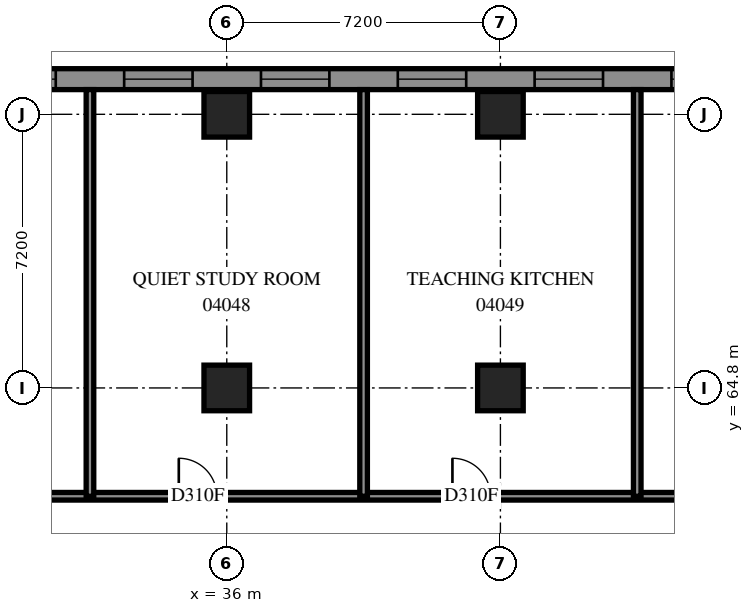
"""IFC4 building model, lengths in metres.
Left out: names, types, materials, properties, quantities, classifications, styles, units other than length and angle.
Written with IfcOpenShell. Run it as: python <this file> out.ifc"""

import sys

from ifc_helpers import new_model, si_unit, direction, frame, frame_2d, origin, origin_2d, place, context, subcontext, project, spatial, polyline, rectangle, outline, extrude, element, fill, save


model = new_model("IFC4")
c1 = context("Model", 3, precision=1e-05, world=origin(), true_north=direction((0.0, 1.0)))
c2 = subcontext(c1, "Body", "Model", "MODEL_VIEW")
j1 = project(units=[si_unit("LENGTHUNIT", "METRE"), si_unit("PLANEANGLEUNIT", "RADIAN")], contexts=[c1])
p1 = place(None, origin())
s1 = spatial("IfcSite", under=j1, at=p1, CompositionType="ELEMENT")
p2 = place(p1, origin())
s2 = spatial("IfcBuilding", under=s1, at=p2, CompositionType="ELEMENT")
p3 = place(p2, frame((0.0, 0.0, 18.6)))
s3 = spatial("IfcBuildingStorey", under=s2, at=p3, CompositionType="ELEMENT", Elevation=18.6)
for number, where, z_axis, x_axis in (
    (1, (36.0, 64.8, 0.0), (0.0, 0.0, 1.0), (1.0, 0.0, 0.0)),
    (2, (36.0, 72.0, 0.0), (0.0, 0.0, 1.0), (1.0, 0.0, 0.0)),
    (3, (43.2, 64.8, 0.0), (0.0, 0.0, 1.0), (1.0, 0.0, 0.0)),
    (4, (43.2, 72.0, 0.0), (0.0, 0.0, 1.0), (1.0, 0.0, 0.0)),
):
    element("IfcColumn", number, at=place(p3, frame(where, z_axis=z_axis, x_axis=x_axis)), inside=s3, PredefinedType="COLUMN", context=c2, shape_type="SweptSolid", body=[
        extrude(rectangle(XDim=1.2, YDim=1.2, at=origin_2d()), origin(), (0.0, 0.0, 1.0), 3.8),
    ])
p4 = place(p3, frame((79.583, 72.925, 0.0), z_axis=(0.0, 0.0, 1.0), x_axis=(-1.0, 0.0, 0.0)))
e5 = element("IfcWall", 5, at=p4, inside=s3, PredefinedType="SOLIDWALL", context=c2, shape_type="SweptSolid", body=[
    extrude(outline(polyline([(-0.114, -0.275), (79.583, -0.275), (79.033, 0.275), (0.114, 0.275), (-0.114, -0.275)])), origin(), (0.0, 0.0, 1.0), 3.8),
])
p5 = place(p4, frame((1.249, 0.0, 0.7)))
e6 = element("IfcOpeningElement", 6, at=p5, cuts=e5, PredefinedType="OPENING", context=c2, shape_type="SweptSolid", body=[
    extrude(rectangle(XDim=1.8, YDim=2.4, at=frame_2d((0.9, 1.2))), frame((0.0, 0.285, 0.0), z_axis=(0.0, -1.0, 0.0), x_axis=(1.0, 0.0, 0.0)), (0.0, 0.0, 1.0), 0.57),
])
p6 = place(p4, frame((4.883, 0.0, 0.7)))
e7 = element("IfcOpeningElement", 7, at=p6, cuts=e5, PredefinedType="OPENING", context=c2, shape_type="SweptSolid", body=[
    extrude(rectangle(XDim=1.8, YDim=2.4, at=frame_2d((0.9, 1.2))), frame((0.0, 0.285, 0.0), z_axis=(0.0, -1.0, 0.0), x_axis=(1.0, 0.0, 0.0)), (0.0, 0.0, 1.0), 0.57),
])
p7 = place(p4, frame((8.483, 0.0, 0.7)))
e8 = element("IfcOpeningElement", 8, at=p7, cuts=e5, PredefinedType="OPENING", context=c2, shape_type="SweptSolid", body=[
    extrude(rectangle(XDim=1.8, YDim=2.4, at=frame_2d((0.9, 1.2))), frame((0.0, 0.285, 0.0), z_axis=(0.0, -1.0, 0.0), x_axis=(1.0, 0.0, 0.0)), (0.0, 0.0, 1.0), 0.57),
])
p8 = place(p4, frame((12.083, 0.0, 0.7)))
e9 = element("IfcOpeningElement", 9, at=p8, cuts=e5, PredefinedType="OPENING", context=c2, shape_type="SweptSolid", body=[
    extrude(rectangle(XDim=1.8, YDim=2.4, at=frame_2d((0.9, 1.2))), frame((0.0, 0.285, 0.0), z_axis=(0.0, -1.0, 0.0), x_axis=(1.0, 0.0, 0.0)), (0.0, 0.0, 1.0), 0.57),
])
p9 = place(p4, frame((15.683, 0.0, 0.7)))
e10 = element("IfcOpeningElement", 10, at=p9, cuts=e5, PredefinedType="OPENING", context=c2, shape_type="SweptSolid", body=[
    extrude(rectangle(XDim=1.8, YDim=2.4, at=frame_2d((0.9, 1.2))), frame((0.0, 0.285, 0.0), z_axis=(0.0, -1.0, 0.0), x_axis=(1.0, 0.0, 0.0)), (0.0, 0.0, 1.0), 0.57),
])
p10 = place(p4, frame((19.283, 0.0, 0.7)))
e11 = element("IfcOpeningElement", 11, at=p10, cuts=e5, PredefinedType="OPENING", context=c2, shape_type="SweptSolid", body=[
    extrude(rectangle(XDim=1.8, YDim=2.4, at=frame_2d((0.9, 1.2))), frame((0.0, 0.285, 0.0), z_axis=(0.0, -1.0, 0.0), x_axis=(1.0, 0.0, 0.0)), (0.0, 0.0, 1.0), 0.57),
])
p11 = place(p4, frame((22.883, 0.0, 0.7)))
e12 = element("IfcOpeningElement", 12, at=p11, cuts=e5, PredefinedType="OPENING", context=c2, shape_type="SweptSolid", body=[
    extrude(rectangle(XDim=1.8, YDim=2.4, at=frame_2d((0.9, 1.2))), frame((0.0, 0.285, 0.0), z_axis=(0.0, -1.0, 0.0), x_axis=(1.0, 0.0, 0.0)), (0.0, 0.0, 1.0), 0.57),
])
p12 = place(p4, frame((26.483, 0.0, 0.7)))
e13 = element("IfcOpeningElement", 13, at=p12, cuts=e5, PredefinedType="OPENING", context=c2, shape_type="SweptSolid", body=[
    extrude(rectangle(XDim=1.8, YDim=2.4, at=frame_2d((0.9, 1.2))), frame((0.0, 0.285, 0.0), z_axis=(0.0, -1.0, 0.0), x_axis=(1.0, 0.0, 0.0)), (0.0, 0.0, 1.0), 0.57),
])
p13 = place(p4, frame((30.083, 0.0, 0.7)))
e14 = element("IfcOpeningElement", 14, at=p13, cuts=e5, PredefinedType="OPENING", context=c2, shape_type="SweptSolid", body=[
    extrude(rectangle(XDim=1.8, YDim=2.4, at=frame_2d((0.9, 1.2))), frame((0.0, 0.285, 0.0), z_axis=(0.0, -1.0, 0.0), x_axis=(1.0, 0.0, 0.0)), (0.0, 0.0, 1.0), 0.57),
])
p14 = place(p4, frame((33.683, 0.0, 0.7)))
e15 = element("IfcOpeningElement", 15, at=p14, cuts=e5, PredefinedType="OPENING", context=c2, shape_type="SweptSolid", body=[
    extrude(rectangle(XDim=1.8, YDim=2.4, at=frame_2d((0.9, 1.2))), frame((0.0, 0.285, 0.0), z_axis=(0.0, -1.0, 0.0), x_axis=(1.0, 0.0, 0.0)), (0.0, 0.0, 1.0), 0.57),
])
p15 = place(p4, frame((37.283, 0.0, 0.7)))
e16 = element("IfcOpeningElement", 16, at=p15, cuts=e5, PredefinedType="OPENING", context=c2, shape_type="SweptSolid", body=[
    extrude(rectangle(XDim=1.8, YDim=2.4, at=frame_2d((0.9, 1.2))), frame((0.0, 0.285, 0.0), z_axis=(0.0, -1.0, 0.0), x_axis=(1.0, 0.0, 0.0)), (0.0, 0.0, 1.0), 0.57),
])
p16 = place(p4, frame((40.883, 0.0, 0.7)))
e17 = element("IfcOpeningElement", 17, at=p16, cuts=e5, PredefinedType="OPENING", context=c2, shape_type="SweptSolid", body=[
    extrude(rectangle(XDim=1.8, YDim=2.4, at=frame_2d((0.9, 1.2))), frame((0.0, 0.285, 0.0), z_axis=(0.0, -1.0, 0.0), x_axis=(1.0, 0.0, 0.0)), (0.0, 0.0, 1.0), 0.57),
])
p17 = place(p4, frame((44.483, 0.0, 0.7)))
e18 = element("IfcOpeningElement", 18, at=p17, cuts=e5, PredefinedType="OPENING", context=c2, shape_type="SweptSolid", body=[
    extrude(rectangle(XDim=1.8, YDim=2.4, at=frame_2d((0.9, 1.2))), frame((0.0, 0.285, 0.0), z_axis=(0.0, -1.0, 0.0), x_axis=(1.0, 0.0, 0.0)), (0.0, 0.0, 1.0), 0.57),
])
p18 = place(p4, frame((48.083, 0.0, 0.7)))
e19 = element("IfcOpeningElement", 19, at=p18, cuts=e5, PredefinedType="OPENING", context=c2, shape_type="SweptSolid", body=[
    extrude(rectangle(XDim=1.8, YDim=2.4, at=frame_2d((0.9, 1.2))), frame((0.0, 0.285, 0.0), z_axis=(0.0, -1.0, 0.0), x_axis=(1.0, 0.0, 0.0)), (0.0, 0.0, 1.0), 0.57),
])
p19 = place(p4, frame((51.683, 0.0, 0.7)))
e20 = element("IfcOpeningElement", 20, at=p19, cuts=e5, PredefinedType="OPENING", context=c2, shape_type="SweptSolid", body=[
    extrude(rectangle(XDim=1.8, YDim=2.4, at=frame_2d((0.9, 1.2))), frame((0.0, 0.285, 0.0), z_axis=(0.0, -1.0, 0.0), x_axis=(1.0, 0.0, 0.0)), (0.0, 0.0, 1.0), 0.57),
])
p20 = place(p4, frame((55.283, 0.0, 0.7)))
e21 = element("IfcOpeningElement", 21, at=p20, cuts=e5, PredefinedType="OPENING", context=c2, shape_type="SweptSolid", body=[
    extrude(rectangle(XDim=1.8, YDim=2.4, at=frame_2d((0.9, 1.2))), frame((0.0, 0.285, 0.0), z_axis=(0.0, -1.0, 0.0), x_axis=(1.0, 0.0, 0.0)), (0.0, 0.0, 1.0), 0.57),
])
p21 = place(p4, frame((58.883, 0.0, 0.7)))
e22 = element("IfcOpeningElement", 22, at=p21, cuts=e5, PredefinedType="OPENING", context=c2, shape_type="SweptSolid", body=[
    extrude(rectangle(XDim=1.8, YDim=2.4, at=frame_2d((0.9, 1.2))), frame((0.0, 0.285, 0.0), z_axis=(0.0, -1.0, 0.0), x_axis=(1.0, 0.0, 0.0)), (0.0, 0.0, 1.0), 0.57),
])
p22 = place(p4, frame((62.483, 0.0, 0.7)))
e23 = element("IfcOpeningElement", 23, at=p22, cuts=e5, PredefinedType="OPENING", context=c2, shape_type="SweptSolid", body=[
    extrude(rectangle(XDim=1.8, YDim=2.4, at=frame_2d((0.9, 1.2))), frame((0.0, 0.285, 0.0), z_axis=(0.0, -1.0, 0.0), x_axis=(1.0, 0.0, 0.0)), (0.0, 0.0, 1.0), 0.57),
])
p23 = place(p4, frame((66.083, 0.0, 0.7)))
e24 = element("IfcOpeningElement", 24, at=p23, cuts=e5, PredefinedType="OPENING", context=c2, shape_type="SweptSolid", body=[
    extrude(rectangle(XDim=1.8, YDim=2.4, at=frame_2d((0.9, 1.2))), frame((0.0, 0.285, 0.0), z_axis=(0.0, -1.0, 0.0), x_axis=(1.0, 0.0, 0.0)), (0.0, 0.0, 1.0), 0.57),
])
p24 = place(p4, frame((69.683, 0.0, 0.7)))
e25 = element("IfcOpeningElement", 25, at=p24, cuts=e5, PredefinedType="OPENING", context=c2, shape_type="SweptSolid", body=[
    extrude(rectangle(XDim=1.8, YDim=2.4, at=frame_2d((0.9, 1.2))), frame((0.0, 0.285, 0.0), z_axis=(0.0, -1.0, 0.0), x_axis=(1.0, 0.0, 0.0)), (0.0, 0.0, 1.0), 0.57),
])
p25 = place(p4, frame((73.683, 0.0, 0.7)))
e26 = element("IfcOpeningElement", 26, at=p25, cuts=e5, PredefinedType="OPENING", context=c2, shape_type="SweptSolid", body=[
    extrude(rectangle(XDim=1.8, YDim=2.4, at=frame_2d((0.9, 1.2))), frame((0.0, 0.285, 0.0), z_axis=(0.0, -1.0, 0.0), x_axis=(1.0, 0.0, 0.0)), (0.0, 0.0, 1.0), 0.57),
])
p26 = place(p4, frame((76.508, 0.0, 0.7)))
e27 = element("IfcOpeningElement", 27, at=p26, cuts=e5, PredefinedType="OPENING", context=c2, shape_type="SweptSolid", body=[
    extrude(rectangle(XDim=1.8, YDim=2.4, at=frame_2d((0.9, 1.2))), frame((0.0, 0.285, 0.0), z_axis=(0.0, -1.0, 0.0), x_axis=(1.0, 0.0, 0.0)), (0.0, 0.0, 1.0), 0.57),
])
p27 = place(p3, frame((0.002, 61.95, 0.0), z_axis=(0.0, 0.0, 1.0), x_axis=(1.0, 0.0, 0.0)))
e28 = element("IfcWall", 28, at=p27, inside=s3, PredefinedType="PARTITIONING", context=c2, shape_type="SweptSolid", body=[
    extrude(rectangle(XDim=55.098, YDim=0.2, at=frame_2d((27.549, 0.0))), origin(), (0.0, 0.0, 1.0), 3.8),
])
p28 = place(p27, frame((8.667, 0.0, 0.0)))
e29 = element("IfcOpeningElement", 29, at=p28, cuts=e28, PredefinedType="OPENING", context=c2, shape_type="SweptSolid", body=[
    extrude(rectangle(XDim=1.0, YDim=2.1, at=frame_2d((0.5, 1.05))), frame((0.0, 0.11, 0.0), z_axis=(0.0, -1.0, 0.0), x_axis=(1.0, 0.0, 0.0)), (0.0, 0.0, 1.0), 0.22),
])
p29 = place(p27, frame((13.136, 0.0, 0.0)))
e30 = element("IfcOpeningElement", 30, at=p29, cuts=e28, PredefinedType="OPENING", context=c2, shape_type="SweptSolid", body=[
    extrude(rectangle(XDim=1.0, YDim=2.1, at=frame_2d((0.5, 1.05))), frame((0.0, 0.11, 0.0), z_axis=(0.0, -1.0, 0.0), x_axis=(1.0, 0.0, 0.0)), (0.0, 0.0, 1.0), 0.22),
])
p30 = place(p27, frame((20.335, 0.0, 0.0)))
e31 = element("IfcOpeningElement", 31, at=p30, cuts=e28, PredefinedType="OPENING", context=c2, shape_type="SweptSolid", body=[
    extrude(rectangle(XDim=1.0, YDim=2.1, at=frame_2d((0.5, 1.05))), frame((0.0, 0.11, 0.0), z_axis=(0.0, -1.0, 0.0), x_axis=(1.0, 0.0, 0.0)), (0.0, 0.0, 1.0), 0.22),
])
p31 = place(p27, frame((27.535, 0.0, 0.0)))
e32 = element("IfcOpeningElement", 32, at=p31, cuts=e28, PredefinedType="OPENING", context=c2, shape_type="SweptSolid", body=[
    extrude(rectangle(XDim=1.0, YDim=2.1, at=frame_2d((0.5, 1.05))), frame((0.0, 0.11, 0.0), z_axis=(0.0, -1.0, 0.0), x_axis=(1.0, 0.0, 0.0)), (0.0, 0.0, 1.0), 0.22),
])
p32 = place(p27, frame((34.736, 0.0, 0.0)))
e33 = element("IfcOpeningElement", 33, at=p32, cuts=e28, PredefinedType="OPENING", context=c2, shape_type="SweptSolid", body=[
    extrude(rectangle(XDim=1.0, YDim=2.1, at=frame_2d((0.5, 1.05))), frame((0.0, 0.11, 0.0), z_axis=(0.0, -1.0, 0.0), x_axis=(1.0, 0.0, 0.0)), (0.0, 0.0, 1.0), 0.22),
])
p33 = place(p27, frame((41.935, 0.0, 0.0)))
e34 = element("IfcOpeningElement", 34, at=p33, cuts=e28, PredefinedType="OPENING", context=c2, shape_type="SweptSolid", body=[
    extrude(rectangle(XDim=1.0, YDim=2.1, at=frame_2d((0.5, 1.05))), frame((0.0, 0.11, 0.0), z_axis=(0.0, -1.0, 0.0), x_axis=(1.0, 0.0, 0.0)), (0.0, 0.0, 1.0), 0.22),
])
p34 = place(p27, frame((49.136, 0.0, 0.0)))
e35 = element("IfcOpeningElement", 35, at=p34, cuts=e28, PredefinedType="OPENING", context=c2, shape_type="SweptSolid", body=[
    extrude(rectangle(XDim=1.0, YDim=2.1, at=frame_2d((0.5, 1.05))), frame((0.0, 0.11, 0.0), z_axis=(0.0, -1.0, 0.0), x_axis=(1.0, 0.0, 0.0)), (0.0, 0.0, 1.0), 0.22),
])
p35 = place(p27, frame((4.799, 0.0, 0.0)))
e36 = element("IfcOpeningElement", 36, at=p35, cuts=e28, PredefinedType="OPENING", context=c2, shape_type="SweptSolid", body=[
    extrude(rectangle(XDim=1.0, YDim=2.1, at=frame_2d((0.5, 1.05))), frame((0.0, 0.11, 0.0), z_axis=(0.0, -1.0, 0.0), x_axis=(1.0, 0.0, 0.0)), (0.0, 0.0, 1.0), 0.22),
])
for number, where, z_axis, x_axis in (
    (37, (32.4, 61.95, 0.0), (0.0, 0.0, 1.0), (0.0, 1.0, 0.0)),
    (38, (39.6, 61.95, 0.0), (0.0, 0.0, 1.0), (0.0, 1.0, 0.0)),
    (39, (46.8, 61.95, 0.0), (0.0, 0.0, 1.0), (0.0, 1.0, 0.0)),
):
    element("IfcWall", number, at=place(p3, frame(where, z_axis=z_axis, x_axis=x_axis)), inside=s3, PredefinedType="PARTITIONING", context=c2, shape_type="SweptSolid", body=[
        extrude(rectangle(XDim=10.7, YDim=0.2, at=frame_2d((5.35, 0.0))), origin(), (0.0, 0.0, 1.0), 3.8),
    ])
p36 = place(p13, origin())
e40 = element("IfcWindow", 40, at=p36, inside=s3, PartitioningType="SINGLE_PANEL", PredefinedType="WINDOW", context=c2, shape_type="SweptSolid", body=[
    extrude(rectangle(XDim=1.8, YDim=2.4, at=frame_2d((0.9, 1.2))), frame((0.0, 0.155, 0.0), z_axis=(0.0, -1.0, 0.0), x_axis=(1.0, 0.0, 0.0)), (0.0, 0.0, 1.0), 0.06),
])
fill(e14, e40)
p37 = place(p14, origin())
e41 = element("IfcWindow", 41, at=p37, inside=s3, PartitioningType="SINGLE_PANEL", PredefinedType="WINDOW", context=c2, shape_type="SweptSolid", body=[
    extrude(rectangle(XDim=1.8, YDim=2.4, at=frame_2d((0.9, 1.2))), frame((0.0, 0.155, 0.0), z_axis=(0.0, -1.0, 0.0), x_axis=(1.0, 0.0, 0.0)), (0.0, 0.0, 1.0), 0.06),
])
fill(e15, e41)
p38 = place(p15, origin())
e42 = element("IfcWindow", 42, at=p38, inside=s3, PartitioningType="SINGLE_PANEL", PredefinedType="WINDOW", context=c2, shape_type="SweptSolid", body=[
    extrude(rectangle(XDim=1.8, YDim=2.4, at=frame_2d((0.9, 1.2))), frame((0.0, 0.155, 0.0), z_axis=(0.0, -1.0, 0.0), x_axis=(1.0, 0.0, 0.0)), (0.0, 0.0, 1.0), 0.06),
])
fill(e16, e42)
p39 = place(p16, origin())
e43 = element("IfcWindow", 43, at=p39, inside=s3, PartitioningType="SINGLE_PANEL", PredefinedType="WINDOW", context=c2, shape_type="SweptSolid", body=[
    extrude(rectangle(XDim=1.8, YDim=2.4, at=frame_2d((0.9, 1.2))), frame((0.0, 0.155, 0.0), z_axis=(0.0, -1.0, 0.0), x_axis=(1.0, 0.0, 0.0)), (0.0, 0.0, 1.0), 0.06),
])
fill(e17, e43)
p40 = place(p17, origin())
e44 = element("IfcWindow", 44, at=p40, inside=s3, PartitioningType="SINGLE_PANEL", PredefinedType="WINDOW", context=c2, shape_type="SweptSolid", body=[
    extrude(rectangle(XDim=1.8, YDim=2.4, at=frame_2d((0.9, 1.2))), frame((0.0, 0.155, 0.0), z_axis=(0.0, -1.0, 0.0), x_axis=(1.0, 0.0, 0.0)), (0.0, 0.0, 1.0), 0.06),
])
fill(e18, e44)
p41 = place(p18, origin())
e45 = element("IfcWindow", 45, at=p41, inside=s3, PartitioningType="SINGLE_PANEL", PredefinedType="WINDOW", context=c2, shape_type="SweptSolid", body=[
    extrude(rectangle(XDim=1.8, YDim=2.4, at=frame_2d((0.9, 1.2))), frame((0.0, 0.155, 0.0), z_axis=(0.0, -1.0, 0.0), x_axis=(1.0, 0.0, 0.0)), (0.0, 0.0, 1.0), 0.06),
])
fill(e19, e45)
p42 = place(p32, origin())
e46 = element("IfcDoor", 46, at=p42, inside=s3, OperationType="SINGLE_SWING_LEFT", PredefinedType="DOOR", context=c2, shape_type="SweptSolid", body=[
    extrude(rectangle(XDim=1.0, YDim=2.1, at=frame_2d((0.5, 1.05))), frame((0.0, 0.025, 0.0), z_axis=(0.0, -1.0, 0.0), x_axis=(1.0, 0.0, 0.0)), (0.0, 0.0, 1.0), 0.05),
])
fill(e33, e46)
p43 = place(p33, origin())
e47 = element("IfcDoor", 47, at=p43, inside=s3, OperationType="SINGLE_SWING_LEFT", PredefinedType="DOOR", context=c2, shape_type="SweptSolid", body=[
    extrude(rectangle(XDim=1.0, YDim=2.1, at=frame_2d((0.5, 1.05))), frame((0.0, 0.025, 0.0), z_axis=(0.0, -1.0, 0.0), x_axis=(1.0, 0.0, 0.0)), (0.0, 0.0, 1.0), 0.05),
])
fill(e34, e47)
save(model, sys.argv[1])
